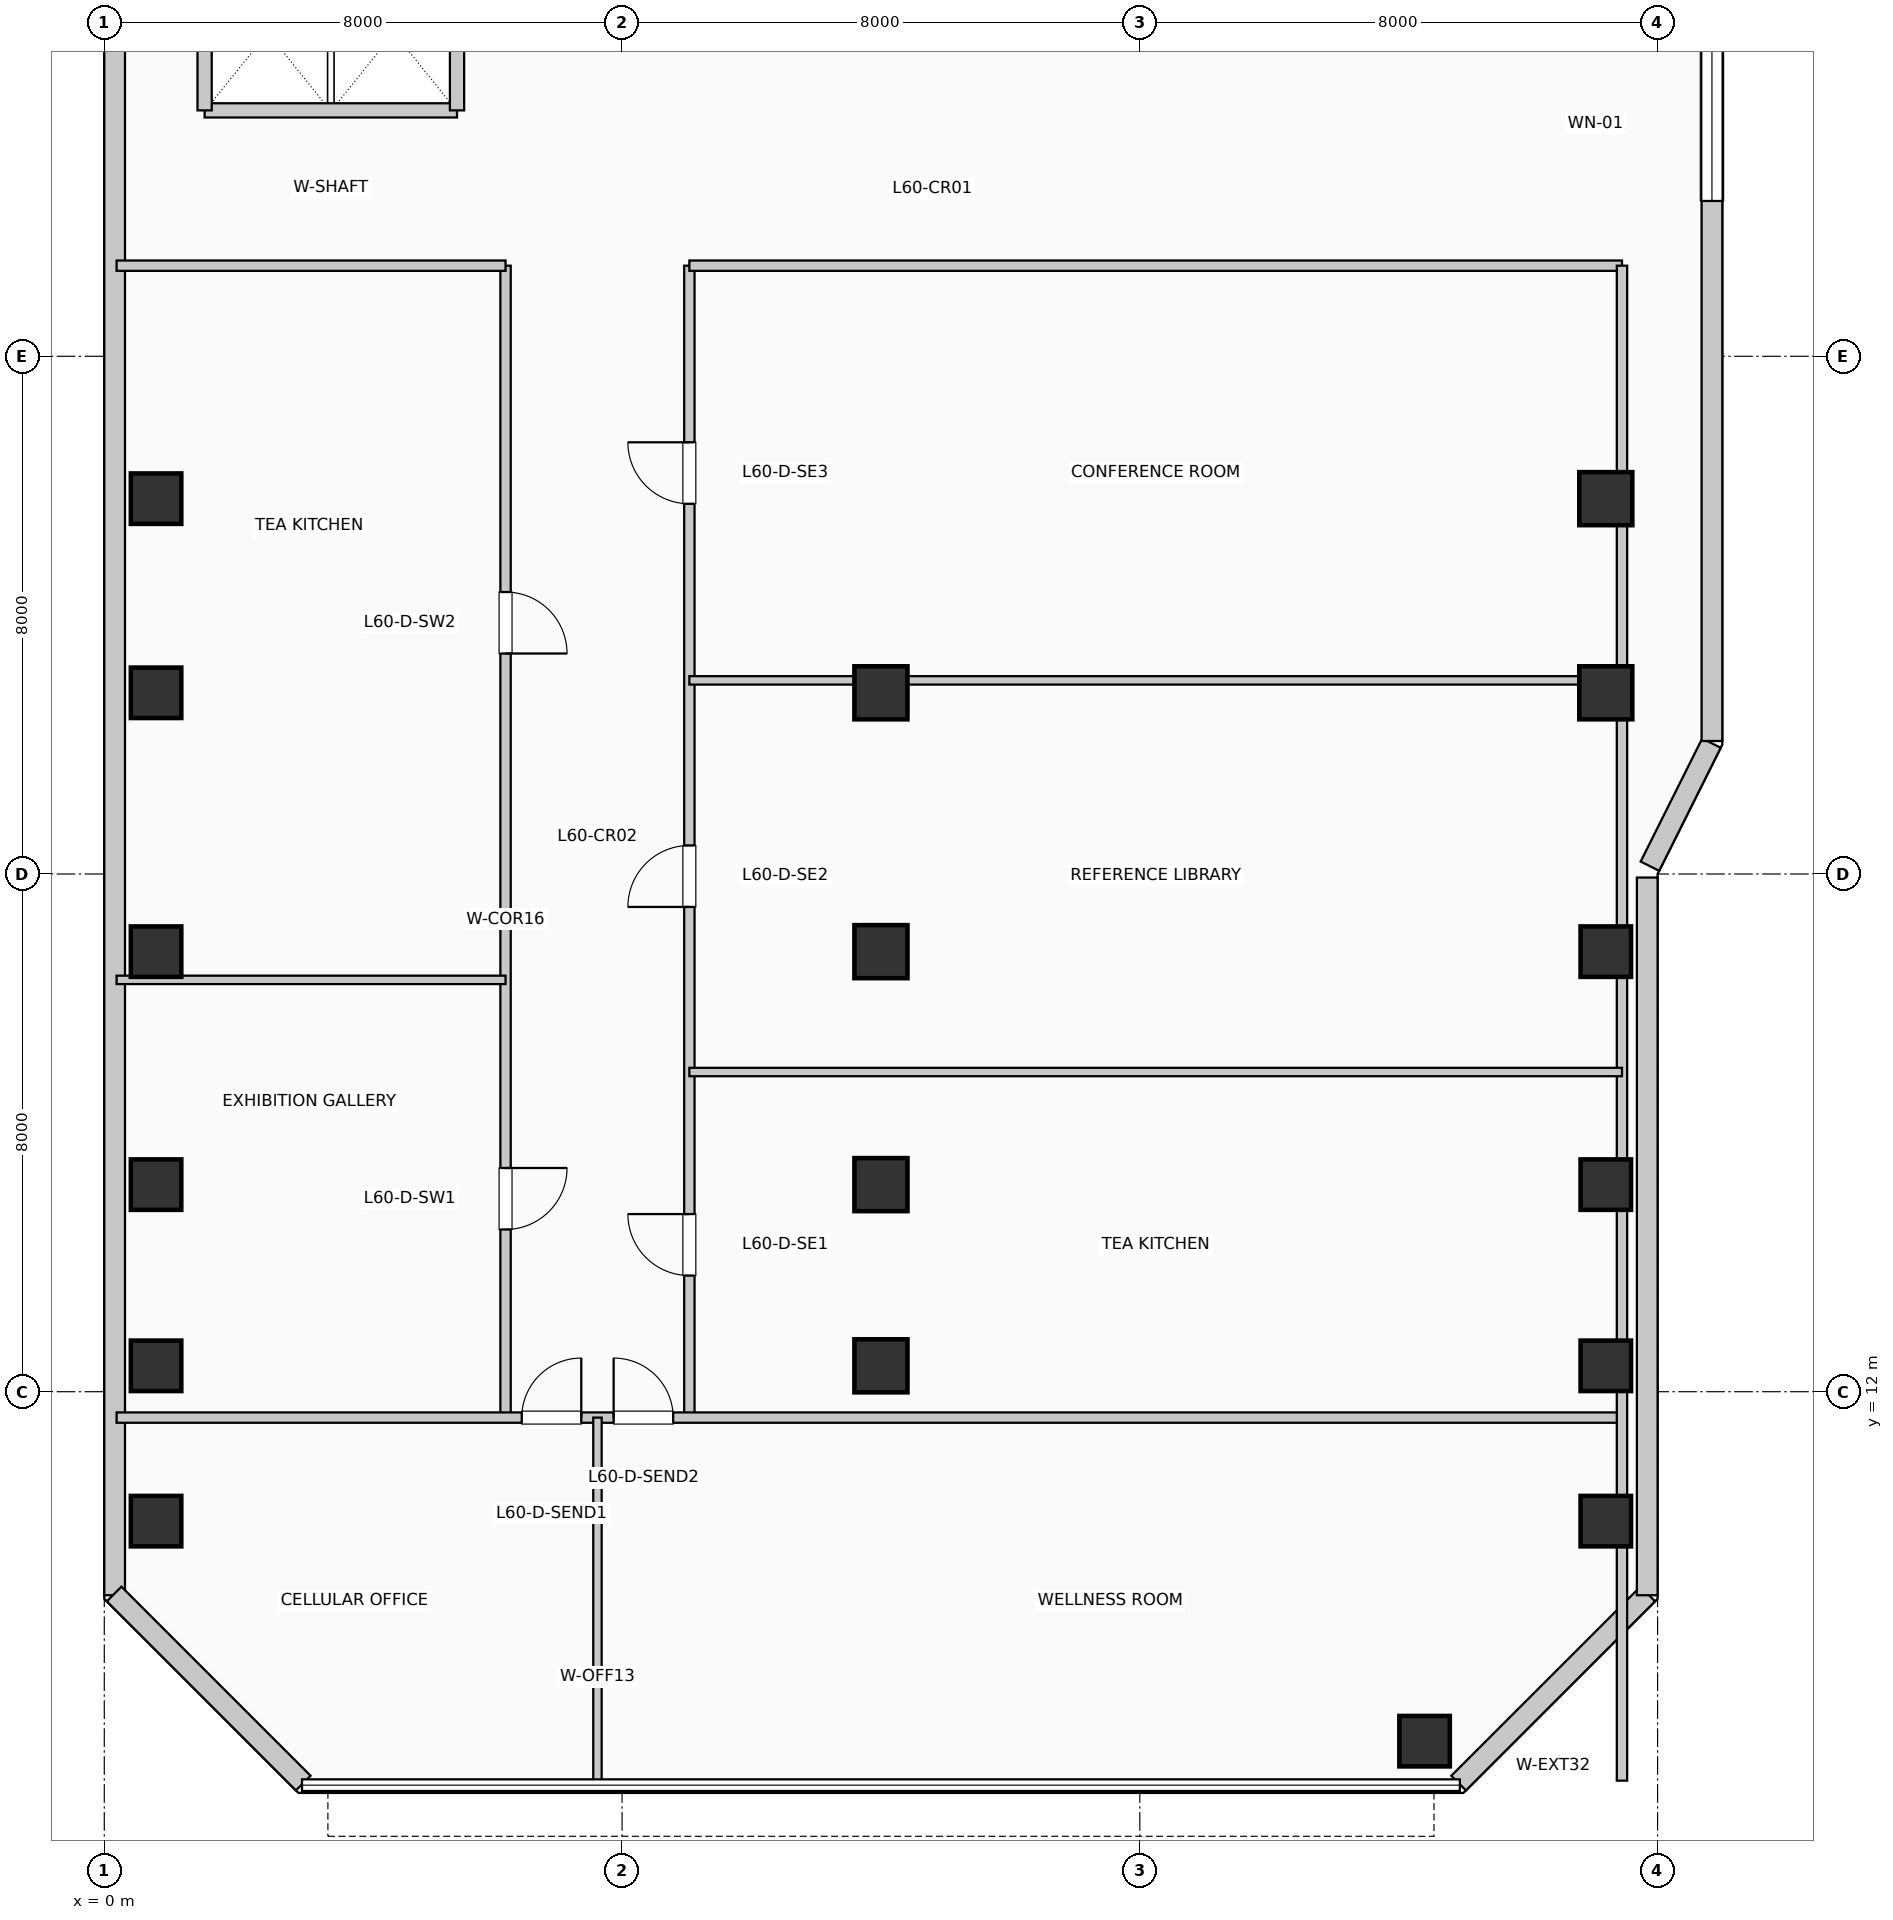
"""IFC4 building model, lengths in metres.
Left out: names, types, materials, properties, quantities, classifications, styles, units other than length and angle.
Written with IfcOpenShell. Run it as: python <this file> out.ifc"""

import sys

from ifc_helpers import new_model, si_unit, direction, frame, frame_2d, origin, origin_2d, place, context, subcontext, project, spatial, rectangle, extrude, element, fill, save


model = new_model("IFC4")
c1 = context("Model", 3, precision=1e-05, world=origin(), true_north=direction((0.0, 1.0)))
c2 = subcontext(c1, "Body", "Model", "MODEL_VIEW")
j1 = project(units=[si_unit("LENGTHUNIT", "METRE"), si_unit("PLANEANGLEUNIT", "RADIAN")], contexts=[c1])
p1 = place(None, origin())
s1 = spatial("IfcSite", under=j1, at=p1, CompositionType="ELEMENT")
p2 = place(p1, origin())
s2 = spatial("IfcBuilding", under=s1, at=p2, CompositionType="ELEMENT")
p3 = place(p2, frame((0.0, 0.0, 247.5)))
s3 = spatial("IfcBuildingStorey", under=s2, at=p3, CompositionType="ELEMENT", Elevation=247.5)
for number, where, z_axis, x_axis in (
    (1, (0.8, 10.0, 0.0), (0.0, 0.0, 1.0), (1.0, 0.0, 0.0)),
    (2, (0.8, 12.4, 0.0), (0.0, 0.0, 1.0), (1.0, 0.0, 0.0)),
    (3, (0.8, 15.2, 0.0), (0.0, 0.0, 1.0), (1.0, 0.0, 0.0)),
    (4, (0.8, 18.8, 0.0), (0.0, 0.0, 1.0), (1.0, 0.0, 0.0)),
    (5, (0.8, 22.8, 0.0), (0.0, 0.0, 1.0), (1.0, 0.0, 0.0)),
    (6, (0.8, 25.8, 0.0), (0.0, 0.0, 1.0), (1.0, 0.0, 0.0)),
):
    element("IfcColumn", number, at=place(p3, frame(where, z_axis=z_axis, x_axis=x_axis)), inside=s3, PredefinedType="COLUMN", context=c2, shape_type="SweptSolid", body=[
        extrude(rectangle(XDim=0.78, YDim=0.78, at=origin_2d()), origin(), (0.0, 0.0, 1.0), 3.96),
    ])
for number, where, z_axis, x_axis in (
    (7, (12.0, 12.4, 0.0), (0.0, 0.0, 1.0), (1.0, 0.0, 0.0)),
    (8, (12.0, 15.2, 0.0), (0.0, 0.0, 1.0), (1.0, 0.0, 0.0)),
    (9, (12.0, 18.8, 0.0), (0.0, 0.0, 1.0), (1.0, 0.0, 0.0)),
    (10, (12.0, 22.8, 0.0), (0.0, 0.0, 1.0), (1.0, 0.0, 0.0)),
):
    element("IfcColumn", number, at=place(p3, frame(where, z_axis=z_axis, x_axis=x_axis)), inside=s3, PredefinedType="COLUMN", context=c2, shape_type="SweptSolid", body=[
        extrude(rectangle(XDim=0.82, YDim=0.82, at=origin_2d()), origin(), (0.0, 0.0, 1.0), 3.96),
    ])
for number, where, z_axis, x_axis in (
    (11, (20.4, 6.6, 0.0), (0.0, 0.0, 1.0), (1.0, 0.0, 0.0)),
    (12, (23.2, 10.0, 0.0), (0.0, 0.0, 1.0), (1.0, 0.0, 0.0)),
    (13, (23.2, 12.4, 0.0), (0.0, 0.0, 1.0), (1.0, 0.0, 0.0)),
    (14, (23.2, 15.2, 0.0), (0.0, 0.0, 1.0), (1.0, 0.0, 0.0)),
    (15, (23.2, 18.8, 0.0), (0.0, 0.0, 1.0), (1.0, 0.0, 0.0)),
):
    element("IfcColumn", number, at=place(p3, frame(where, z_axis=z_axis, x_axis=x_axis)), inside=s3, PredefinedType="COLUMN", context=c2, shape_type="SweptSolid", body=[
        extrude(rectangle(XDim=0.78, YDim=0.78, at=origin_2d()), origin(), (0.0, 0.0, 1.0), 3.96),
    ])
for number, where, z_axis, x_axis in (
    (16, (23.2, 22.8, 0.0), (0.0, 0.0, 1.0), (1.0, 0.0, 0.0)),
    (17, (23.2, 25.8, 0.0), (0.0, 0.0, 1.0), (1.0, 0.0, 0.0)),
):
    element("IfcColumn", number, at=place(p3, frame(where, z_axis=z_axis, x_axis=x_axis)), inside=s3, PredefinedType="COLUMN", context=c2, shape_type="SweptSolid", body=[
        extrude(rectangle(XDim=0.82, YDim=0.82, at=origin_2d()), origin(), (0.0, 0.0, 1.0), 3.96),
    ])
p4 = place(p3, frame((20.926, 5.952, 0.0), z_axis=(0.0, 0.0, 1.0), x_axis=(0.707077242712, 0.707136318428, 0.0)))
e18 = element("IfcWall", 18, at=p4, inside=s3, PredefinedType="SOLIDWALL", context=c2, shape_type="SweptSolid", body=[
    extrude(rectangle(XDim=4.133, YDim=0.32, at=frame_2d((2.066, 0.0))), origin(), (0.0, 0.0, 1.0), 3.54),
])
p5 = place(p3, frame((23.84, 8.855, 0.0), z_axis=(0.0, 0.0, 1.0), x_axis=(0.0, 1.0, 0.0)))
e19 = element("IfcWall", 19, at=p5, inside=s3, PredefinedType="SOLIDWALL", context=c2, shape_type="SweptSolid", body=[
    extrude(rectangle(XDim=11.09, YDim=0.32, at=frame_2d((5.545, 0.0))), origin(), (0.0, 0.0, 1.0), 3.54),
])
p6 = place(p3, frame((23.882, 20.121, 0.0), z_axis=(0.0, 0.0, 1.0), x_axis=(0.447121734542, 0.894473115583, 0.0)))
e20 = element("IfcWall", 20, at=p6, inside=s3, PredefinedType="SOLIDWALL", context=c2, shape_type="SweptSolid", body=[
    extrude(rectangle(XDim=2.126, YDim=0.32, at=frame_2d((1.063, 0.0))), origin(), (0.0, 0.0, 1.0), 3.54),
])
p7 = place(p3, frame((24.84, 22.055, 0.0), z_axis=(0.0, 0.0, 1.0), x_axis=(0.0, 1.0, 0.0)))
e21 = element("IfcWall", 21, at=p7, inside=s3, PredefinedType="SOLIDWALL", context=c2, shape_type="SweptSolid", body=[
    extrude(rectangle(XDim=19.09, YDim=0.32, at=frame_2d((9.545, 0.0))), origin(), (0.0, 0.0, 1.0), 3.54),
])
p8 = place(p7, frame((8.345, 0.0, 0.85)))
e22 = element("IfcOpeningElement", 22, at=p8, cuts=e21, PredefinedType="OPENING", context=c2, shape_type="SweptSolid", body=[
    extrude(rectangle(XDim=2.4, YDim=2.05, at=frame_2d((1.2, 1.025))), frame((0.0, 0.17, 0.0), z_axis=(0.0, -1.0, 0.0), x_axis=(1.0, 0.0, 0.0)), (0.0, 0.0, 1.0), 0.34),
])
p9 = place(p3, frame((0.16, 34.395, 0.0), z_axis=(0.0, 0.0, 1.0), x_axis=(0.0, -1.0, 0.0)))
e23 = element("IfcWall", 23, at=p9, inside=s3, PredefinedType="SOLIDWALL", context=c2, shape_type="SweptSolid", body=[
    extrude(rectangle(XDim=25.54, YDim=0.32, at=frame_2d((12.77, 0.0))), origin(), (0.0, 0.0, 1.0), 3.54),
])
p10 = place(p3, frame((0.152, 8.874, 0.0), z_axis=(0.0, 0.0, 1.0), x_axis=(0.707077242712, -0.707136318428, 0.0)))
e24 = element("IfcWall", 24, at=p10, inside=s3, PredefinedType="SOLIDWALL", context=c2, shape_type="SweptSolid", body=[
    extrude(rectangle(XDim=4.133, YDim=0.32, at=frame_2d((2.066, 0.0))), origin(), (0.0, 0.0, 1.0), 3.54),
])
p11 = place(p3, frame((1.55, 31.8, 0.0), z_axis=(0.0, 0.0, 1.0), x_axis=(1.0, 0.0, 0.0)))
e25 = element("IfcWall", 25, at=p11, inside=s3, PredefinedType="PARTITIONING", context=c2, shape_type="SweptSolid", body=[
    extrude(rectangle(XDim=3.9, YDim=0.22, at=frame_2d((1.95, 0.0))), origin(), (0.0, 0.0, 1.0), 3.54),
])
for number, where, z_axis, x_axis in (
    (26, (1.55, 31.8, 0.0), (0.0, 0.0, 1.0), (0.0, 1.0, 0.0)),
    (27, (5.45, 31.8, 0.0), (0.0, 0.0, 1.0), (0.0, 1.0, 0.0)),
):
    element("IfcWall", number, at=place(p3, frame(where, z_axis=z_axis, x_axis=x_axis)), inside=s3, PredefinedType="PARTITIONING", context=c2, shape_type="SweptSolid", body=[
        extrude(rectangle(XDim=2.38, YDim=0.22, at=frame_2d((1.19, 0.0))), origin(), (0.0, 0.0, 1.0), 3.54),
    ])
p12 = place(p3, frame((6.2, 11.6, 0.0), z_axis=(0.0, 0.0, 1.0), x_axis=(0.0, 1.0, 0.0)))
e28 = element("IfcWall", 28, at=p12, inside=s3, PredefinedType="PARTITIONING", context=c2, shape_type="SweptSolid", body=[
    extrude(rectangle(XDim=17.8, YDim=0.16, at=frame_2d((8.9, 0.0))), origin(), (0.0, 0.0, 1.0), 3.54),
])
p13 = place(p12, frame((3.857, 0.0, 0.0), z_axis=(0.0, 0.0, 1.0), x_axis=(-1.0, 0.0, 0.0)))
e29 = element("IfcOpeningElement", 29, at=p13, cuts=e28, PredefinedType="OPENING", context=c2, shape_type="SweptSolid", body=[
    extrude(rectangle(XDim=0.95, YDim=2.15, at=frame_2d((0.475, 1.075))), frame((0.0, 0.09, 0.0), z_axis=(0.0, -1.0, 0.0), x_axis=(1.0, 0.0, 0.0)), (0.0, 0.0, 1.0), 0.18),
])
p14 = place(p12, frame((12.757, 0.0, 0.0), z_axis=(0.0, 0.0, 1.0), x_axis=(-1.0, 0.0, 0.0)))
e30 = element("IfcOpeningElement", 30, at=p14, cuts=e28, PredefinedType="OPENING", context=c2, shape_type="SweptSolid", body=[
    extrude(rectangle(XDim=0.95, YDim=2.15, at=frame_2d((0.475, 1.075))), frame((0.0, 0.09, 0.0), z_axis=(0.0, -1.0, 0.0), x_axis=(1.0, 0.0, 0.0)), (0.0, 0.0, 1.0), 0.18),
])
p15 = place(p3, frame((9.04, 11.6, 0.0), z_axis=(0.0, 0.0, 1.0), x_axis=(0.0, 1.0, 0.0)))
e31 = element("IfcWall", 31, at=p15, inside=s3, PredefinedType="PARTITIONING", context=c2, shape_type="SweptSolid", body=[
    extrude(rectangle(XDim=17.8, YDim=0.16, at=frame_2d((8.9, 0.0))), origin(), (0.0, 0.0, 1.0), 3.54),
])
p16 = place(p15, frame((2.195, 0.0, 0.0)))
e32 = element("IfcOpeningElement", 32, at=p16, cuts=e31, PredefinedType="OPENING", context=c2, shape_type="SweptSolid", body=[
    extrude(rectangle(XDim=0.95, YDim=2.15, at=frame_2d((0.475, 1.075))), frame((0.0, 0.09, 0.0), z_axis=(0.0, -1.0, 0.0), x_axis=(1.0, 0.0, 0.0)), (0.0, 0.0, 1.0), 0.18),
])
p17 = place(p15, frame((7.891, 0.0, 0.0)))
e33 = element("IfcOpeningElement", 33, at=p17, cuts=e31, PredefinedType="OPENING", context=c2, shape_type="SweptSolid", body=[
    extrude(rectangle(XDim=0.95, YDim=2.15, at=frame_2d((0.475, 1.075))), frame((0.0, 0.09, 0.0), z_axis=(0.0, -1.0, 0.0), x_axis=(1.0, 0.0, 0.0)), (0.0, 0.0, 1.0), 0.18),
])
p18 = place(p15, frame((14.121, 0.0, 0.0)))
e34 = element("IfcOpeningElement", 34, at=p18, cuts=e31, PredefinedType="OPENING", context=c2, shape_type="SweptSolid", body=[
    extrude(rectangle(XDim=0.95, YDim=2.15, at=frame_2d((0.475, 1.075))), frame((0.0, 0.09, 0.0), z_axis=(0.0, -1.0, 0.0), x_axis=(1.0, 0.0, 0.0)), (0.0, 0.0, 1.0), 0.18),
])
p19 = place(p3, frame((0.19, 11.6, 0.0), z_axis=(0.0, 0.0, 1.0), x_axis=(1.0, 0.0, 0.0)))
e35 = element("IfcWall", 35, at=p19, inside=s3, PredefinedType="PARTITIONING", context=c2, shape_type="SweptSolid", body=[
    extrude(rectangle(XDim=23.26, YDim=0.16, at=frame_2d((11.63, 0.0))), origin(), (0.0, 0.0, 1.0), 3.54),
])
p20 = place(p19, frame((6.26, 0.0, 0.0)))
e36 = element("IfcOpeningElement", 36, at=p20, cuts=e35, PredefinedType="OPENING", context=c2, shape_type="SweptSolid", body=[
    extrude(rectangle(XDim=0.92, YDim=2.1, at=frame_2d((0.46, 1.05))), frame((0.0, 0.09, 0.0), z_axis=(0.0, -1.0, 0.0), x_axis=(1.0, 0.0, 0.0)), (0.0, 0.0, 1.0), 0.18),
])
p21 = place(p19, frame((7.68, 0.0, 0.0)))
e37 = element("IfcOpeningElement", 37, at=p21, cuts=e35, PredefinedType="OPENING", context=c2, shape_type="SweptSolid", body=[
    extrude(rectangle(XDim=0.92, YDim=2.1, at=frame_2d((0.46, 1.05))), frame((0.0, 0.09, 0.0), z_axis=(0.0, -1.0, 0.0), x_axis=(1.0, 0.0, 0.0)), (0.0, 0.0, 1.0), 0.18),
])
p22 = place(p3, frame((0.19, 29.4, 0.0), z_axis=(0.0, 0.0, 1.0), x_axis=(1.0, 0.0, 0.0)))
e38 = element("IfcWall", 38, at=p22, inside=s3, PredefinedType="PARTITIONING", context=c2, shape_type="SweptSolid", body=[
    extrude(rectangle(XDim=6.01, YDim=0.16, at=frame_2d((3.005, 0.0))), origin(), (0.0, 0.0, 1.0), 3.195),
])
p23 = place(p3, frame((9.04, 29.4, 0.0), z_axis=(0.0, 0.0, 1.0), x_axis=(1.0, 0.0, 0.0)))
e39 = element("IfcWall", 39, at=p23, inside=s3, PredefinedType="PARTITIONING", context=c2, shape_type="SweptSolid", body=[
    extrude(rectangle(XDim=14.41, YDim=0.16, at=frame_2d((7.205, 0.0))), origin(), (0.0, 0.0, 1.0), 3.195),
])
p24 = place(p3, frame((23.45, 5.99, 0.0), z_axis=(0.0, 0.0, 1.0), x_axis=(0.0, 1.0, 0.0)))
e40 = element("IfcWall", 40, at=p24, inside=s3, PredefinedType="PARTITIONING", context=c2, shape_type="SweptSolid", body=[
    extrude(rectangle(XDim=23.41, YDim=0.16, at=frame_2d((11.705, 0.0))), origin(), (0.0, 0.0, 1.0), 2.925),
])
p25 = place(p3, frame((7.62, 5.99, 0.0), z_axis=(0.0, 0.0, 1.0), x_axis=(0.0, 1.0, 0.0)))
e41 = element("IfcWall", 41, at=p25, inside=s3, PredefinedType="PARTITIONING", context=c2, shape_type="SweptSolid", body=[
    extrude(rectangle(XDim=5.61, YDim=0.13, at=frame_2d((2.805, 0.0))), origin(), (0.0, 0.0, 1.0), 3.54),
])
p26 = place(p3, frame((0.19, 18.364, 0.0), z_axis=(0.0, 0.0, 1.0), x_axis=(1.0, 0.0, 0.0)))
e42 = element("IfcWall", 42, at=p26, inside=s3, PredefinedType="PARTITIONING", context=c2, shape_type="SweptSolid", body=[
    extrude(rectangle(XDim=6.01, YDim=0.13, at=frame_2d((3.005, 0.0))), origin(), (0.0, 0.0, 1.0), 2.925),
])
p27 = place(p3, frame((9.04, 16.94, 0.0), z_axis=(0.0, 0.0, 1.0), x_axis=(1.0, 0.0, 0.0)))
e43 = element("IfcWall", 43, at=p27, inside=s3, PredefinedType="PARTITIONING", context=c2, shape_type="SweptSolid", body=[
    extrude(rectangle(XDim=14.41, YDim=0.13, at=frame_2d((7.205, 0.0))), origin(), (0.0, 0.0, 1.0), 3.54),
])
p28 = place(p3, frame((9.04, 22.992, 0.0), z_axis=(0.0, 0.0, 1.0), x_axis=(1.0, 0.0, 0.0)))
e44 = element("IfcWall", 44, at=p28, inside=s3, PredefinedType="PARTITIONING", context=c2, shape_type="SweptSolid", body=[
    extrude(rectangle(XDim=14.41, YDim=0.13, at=frame_2d((7.205, 0.0))), origin(), (0.0, 0.0, 1.0), 2.925),
])
p29 = place(p8, origin())
e45 = element("IfcWindow", 45, at=p29, inside=s3, PartitioningType="SINGLE_PANEL", PredefinedType="WINDOW", context=c2, shape_type="SweptSolid", body=[
    extrude(rectangle(XDim=2.4, YDim=2.05, at=frame_2d((1.2, 1.025))), frame((0.0, 0.03, 0.0), z_axis=(0.0, -1.0, 0.0), x_axis=(1.0, 0.0, 0.0)), (0.0, 0.0, 1.0), 0.06),
])
fill(e22, e45)
p30 = place(p20, origin())
e46 = element("IfcDoor", 46, at=p30, inside=s3, OperationType="SINGLE_SWING_RIGHT", PredefinedType="DOOR", context=c2, shape_type="SweptSolid", body=[
    extrude(rectangle(XDim=0.92, YDim=2.1, at=frame_2d((0.46, 1.05))), frame((0.0, 0.025, 0.0), z_axis=(0.0, -1.0, 0.0), x_axis=(1.0, 0.0, 0.0)), (0.0, 0.0, 1.0), 0.05),
])
fill(e36, e46)
p31 = place(p21, origin())
e47 = element("IfcDoor", 47, at=p31, inside=s3, OperationType="SINGLE_SWING_LEFT", PredefinedType="DOOR", context=c2, shape_type="SweptSolid", body=[
    extrude(rectangle(XDim=0.92, YDim=2.1, at=frame_2d((0.46, 1.05))), frame((0.0, 0.025, 0.0), z_axis=(0.0, -1.0, 0.0), x_axis=(1.0, 0.0, 0.0)), (0.0, 0.0, 1.0), 0.05),
])
fill(e37, e47)
p32 = place(p13, origin())
e48 = element("IfcDoor", 48, at=p32, inside=s3, OperationType="SINGLE_SWING_RIGHT", PredefinedType="DOOR", context=c2, shape_type="SweptSolid", body=[
    extrude(rectangle(XDim=0.95, YDim=2.15, at=frame_2d((0.475, 1.075))), frame((0.0, 0.025, 0.0), z_axis=(0.0, -1.0, 0.0), x_axis=(1.0, 0.0, 0.0)), (0.0, 0.0, 1.0), 0.05),
])
fill(e29, e48)
p33 = place(p14, origin())
e49 = element("IfcDoor", 49, at=p33, inside=s3, OperationType="SINGLE_SWING_LEFT", PredefinedType="DOOR", context=c2, shape_type="SweptSolid", body=[
    extrude(rectangle(XDim=0.95, YDim=2.15, at=frame_2d((0.475, 1.075))), frame((0.0, 0.025, 0.0), z_axis=(0.0, -1.0, 0.0), x_axis=(1.0, 0.0, 0.0)), (0.0, 0.0, 1.0), 0.05),
])
fill(e30, e49)
p34 = place(p16, origin())
e50 = element("IfcDoor", 50, at=p34, inside=s3, OperationType="SINGLE_SWING_RIGHT", PredefinedType="DOOR", context=c2, shape_type="SweptSolid", body=[
    extrude(rectangle(XDim=0.95, YDim=2.15, at=frame_2d((0.475, 1.075))), frame((0.0, 0.025, 0.0), z_axis=(0.0, -1.0, 0.0), x_axis=(1.0, 0.0, 0.0)), (0.0, 0.0, 1.0), 0.05),
])
fill(e32, e50)
p35 = place(p17, origin())
e51 = element("IfcDoor", 51, at=p35, inside=s3, OperationType="SINGLE_SWING_LEFT", PredefinedType="DOOR", context=c2, shape_type="SweptSolid", body=[
    extrude(rectangle(XDim=0.95, YDim=2.15, at=frame_2d((0.475, 1.075))), frame((0.0, 0.025, 0.0), z_axis=(0.0, -1.0, 0.0), x_axis=(1.0, 0.0, 0.0)), (0.0, 0.0, 1.0), 0.05),
])
fill(e33, e51)
p36 = place(p18, origin())
e52 = element("IfcDoor", 52, at=p36, inside=s3, OperationType="SINGLE_SWING_RIGHT", PredefinedType="DOOR", context=c2, shape_type="SweptSolid", body=[
    extrude(rectangle(XDim=0.95, YDim=2.15, at=frame_2d((0.475, 1.075))), frame((0.0, 0.025, 0.0), z_axis=(0.0, -1.0, 0.0), x_axis=(1.0, 0.0, 0.0)), (0.0, 0.0, 1.0), 0.05),
])
fill(e34, e52)
save(model, sys.argv[1])
